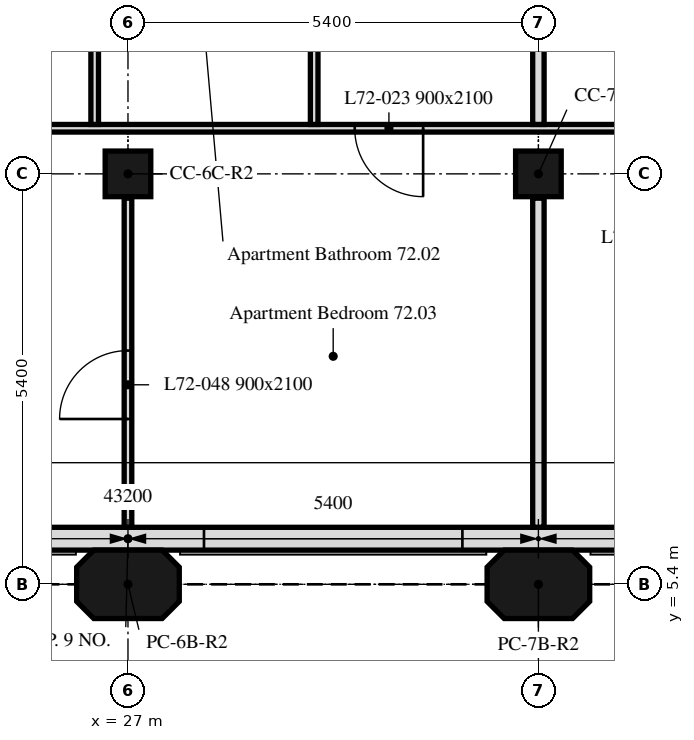
"""IFC4 building model, lengths in metres.
Left out: names, types, materials, properties, quantities, classifications, styles, units other than length and angle.
Written with IfcOpenShell. Run it as: python <this file> out.ifc"""

import sys

from ifc_helpers import new_model, si_unit, direction, frame, frame_2d, origin, origin_2d, place, context, subcontext, project, spatial, polyline, rectangle, outline, extrude, element, fill, save


model = new_model("IFC4")
c1 = context("Model", 3, precision=1e-05, world=origin(), true_north=direction((0.0, 1.0)))
c2 = subcontext(c1, "Body", "Model", "MODEL_VIEW")
j1 = project(units=[si_unit("LENGTHUNIT", "METRE"), si_unit("PLANEANGLEUNIT", "RADIAN")], contexts=[c1])
p1 = place(None, origin())
s1 = spatial("IfcSite", under=j1, at=p1, CompositionType="ELEMENT")
p2 = place(p1, origin())
s2 = spatial("IfcBuilding", under=s1, at=p2, CompositionType="ELEMENT")
p3 = place(p2, frame((0.0, 0.0, 291.7)))
s3 = spatial("IfcBuildingStorey", under=s2, at=p3, CompositionType="ELEMENT", Elevation=291.7)
for number, where, z_axis, x_axis in (
    (1, (27.0, 5.4, 0.0), (0.0, 0.0, 1.0), (1.0, 0.0, 0.0)),
    (2, (32.4, 5.4, 0.0), (0.0, 0.0, 1.0), (1.0, 0.0, 0.0)),
):
    element("IfcColumn", number, at=place(p3, frame(where, z_axis=z_axis, x_axis=x_axis)), inside=s3, PredefinedType="COLUMN", context=c2, shape_type="SweptSolid", body=[
        extrude(outline(polyline([(-0.45, -0.45), (0.45, -0.45), (0.675, -0.225), (0.675, 0.225), (0.45, 0.45), (-0.45, 0.45), (-0.675, 0.225), (-0.675, -0.225), (-0.45, -0.45)])), origin(), (0.0, 0.0, 1.0), 3.0),
    ])
for number, where, z_axis, x_axis in (
    (3, (27.0, 10.8, 0.0), (0.0, 0.0, 1.0), (1.0, 0.0, 0.0)),
    (4, (32.4, 10.8, 0.0), (0.0, 0.0, 1.0), (1.0, 0.0, 0.0)),
):
    element("IfcColumn", number, at=place(p3, frame(where, z_axis=z_axis, x_axis=x_axis)), inside=s3, PredefinedType="COLUMN", context=c2, shape_type="SweptSolid", body=[
        extrude(rectangle(XDim=0.6, YDim=0.6, at=origin_2d()), origin(), (0.0, 0.0, 1.0), 3.0),
    ])
p4 = place(p3, frame((10.986, 6.0, 0.0), z_axis=(0.0, 0.0, 1.0), x_axis=(1.0, 0.0, 0.0)))
e5 = element("IfcWall", 5, at=p4, inside=s3, PredefinedType="SOLIDWALL", context=c2, shape_type="SweptSolid", body=[
    extrude(rectangle(XDim=32.027, YDim=0.3, at=frame_2d((16.014, 0.0))), origin(), (0.0, 0.0, 1.0), 3.0),
])
p5 = place(p4, frame((2.764, 0.0, 0.9)))
e6 = element("IfcOpeningElement", 6, at=p5, cuts=e5, PredefinedType="OPENING", context=c2, shape_type="SweptSolid", body=[
    extrude(rectangle(XDim=1.1, YDim=1.7, at=frame_2d((0.55, 0.85))), frame((0.0, 0.16, 0.0), z_axis=(0.0, -1.0, 0.0), x_axis=(1.0, 0.0, 0.0)), (0.0, 0.0, 1.0), 0.32),
])
p6 = place(p4, frame((6.214, 0.0, 0.9)))
e7 = element("IfcOpeningElement", 7, at=p6, cuts=e5, PredefinedType="OPENING", context=c2, shape_type="SweptSolid", body=[
    extrude(rectangle(XDim=3.4, YDim=1.7, at=frame_2d((1.7, 0.85))), frame((0.0, 0.16, 0.0), z_axis=(0.0, -1.0, 0.0), x_axis=(1.0, 0.0, 0.0)), (0.0, 0.0, 1.0), 0.32),
])
p7 = place(p4, frame((13.564, 0.0, 0.9)))
e8 = element("IfcOpeningElement", 8, at=p7, cuts=e5, PredefinedType="OPENING", context=c2, shape_type="SweptSolid", body=[
    extrude(rectangle(XDim=1.1, YDim=1.7, at=frame_2d((0.55, 0.85))), frame((0.0, 0.16, 0.0), z_axis=(0.0, -1.0, 0.0), x_axis=(1.0, 0.0, 0.0)), (0.0, 0.0, 1.0), 0.32),
])
p8 = place(p4, frame((17.014, 0.0, 0.9)))
e9 = element("IfcOpeningElement", 9, at=p8, cuts=e5, PredefinedType="OPENING", context=c2, shape_type="SweptSolid", body=[
    extrude(rectangle(XDim=3.4, YDim=1.7, at=frame_2d((1.7, 0.85))), frame((0.0, 0.16, 0.0), z_axis=(0.0, -1.0, 0.0), x_axis=(1.0, 0.0, 0.0)), (0.0, 0.0, 1.0), 0.32),
])
p9 = place(p4, frame((24.364, 0.0, 0.9)))
e10 = element("IfcOpeningElement", 10, at=p9, cuts=e5, PredefinedType="OPENING", context=c2, shape_type="SweptSolid", body=[
    extrude(rectangle(XDim=1.1, YDim=1.7, at=frame_2d((0.55, 0.85))), frame((0.0, 0.16, 0.0), z_axis=(0.0, -1.0, 0.0), x_axis=(1.0, 0.0, 0.0)), (0.0, 0.0, 1.0), 0.32),
])
p10 = place(p4, frame((27.814, 0.0, 0.9)))
e11 = element("IfcOpeningElement", 11, at=p10, cuts=e5, PredefinedType="OPENING", context=c2, shape_type="SweptSolid", body=[
    extrude(rectangle(XDim=3.4, YDim=1.7, at=frame_2d((1.7, 0.85))), frame((0.0, 0.16, 0.0), z_axis=(0.0, -1.0, 0.0), x_axis=(1.0, 0.0, 0.0)), (0.0, 0.0, 1.0), 0.32),
])
p11 = place(p3, frame((37.8, 11.4, 0.0), z_axis=(0.0, 0.0, 1.0), x_axis=(-1.0, 0.0, 0.0)))
e12 = element("IfcWall", 12, at=p11, inside=s3, PredefinedType="PARTITIONING", context=c2, shape_type="SweptSolid", body=[
    extrude(rectangle(XDim=21.6, YDim=0.1, at=frame_2d((10.8, 0.0))), origin(), (0.0, 0.0, 1.0), 3.0),
])
p12 = place(p11, frame((18.87, 0.0, 0.0)))
e13 = element("IfcOpeningElement", 13, at=p12, cuts=e12, PredefinedType="OPENING", context=c2, shape_type="SweptSolid", body=[
    extrude(rectangle(XDim=0.9, YDim=2.1, at=frame_2d((0.45, 1.05))), frame((0.0, 0.05, 0.0), z_axis=(0.0, -1.0, 0.0), x_axis=(1.0, 0.0, 0.0)), (0.0, 0.0, 1.0), 0.1),
])
p13 = place(p11, frame((17.5, 0.0, 0.0)))
e14 = element("IfcOpeningElement", 14, at=p13, cuts=e12, PredefinedType="OPENING", context=c2, shape_type="SweptSolid", body=[
    extrude(rectangle(XDim=0.9, YDim=2.1, at=frame_2d((0.45, 1.05))), frame((0.0, 0.05, 0.0), z_axis=(0.0, -1.0, 0.0), x_axis=(1.0, 0.0, 0.0)), (0.0, 0.0, 1.0), 0.1),
])
p14 = place(p11, frame((6.917, 0.0, 0.0)))
e15 = element("IfcOpeningElement", 15, at=p14, cuts=e12, PredefinedType="OPENING", context=c2, shape_type="SweptSolid", body=[
    extrude(rectangle(XDim=0.9, YDim=2.1, at=frame_2d((0.45, 1.05))), frame((0.0, 0.05, 0.0), z_axis=(0.0, -1.0, 0.0), x_axis=(1.0, 0.0, 0.0)), (0.0, 0.0, 1.0), 0.1),
])
p15 = place(p11, frame((3.15, 0.0, 0.0)))
e16 = element("IfcOpeningElement", 16, at=p15, cuts=e12, PredefinedType="OPENING", context=c2, shape_type="SweptSolid", body=[
    extrude(rectangle(XDim=0.9, YDim=2.1, at=frame_2d((0.45, 1.05))), frame((0.0, 0.05, 0.0), z_axis=(0.0, -1.0, 0.0), x_axis=(1.0, 0.0, 0.0)), (0.0, 0.0, 1.0), 0.1),
])
p16 = place(p11, frame((14.158, 0.0, 0.0)))
e17 = element("IfcOpeningElement", 17, at=p16, cuts=e12, PredefinedType="OPENING", context=c2, shape_type="SweptSolid", body=[
    extrude(rectangle(XDim=0.9, YDim=2.1, at=frame_2d((0.45, 1.05))), frame((0.0, 0.05, 0.0), z_axis=(0.0, -1.0, 0.0), x_axis=(1.0, 0.0, 0.0)), (0.0, 0.0, 1.0), 0.1),
])
p17 = place(p11, frame((12.788, 0.0, 0.0)))
e18 = element("IfcOpeningElement", 18, at=p17, cuts=e12, PredefinedType="OPENING", context=c2, shape_type="SweptSolid", body=[
    extrude(rectangle(XDim=0.9, YDim=2.1, at=frame_2d((0.45, 1.05))), frame((0.0, 0.05, 0.0), z_axis=(0.0, -1.0, 0.0), x_axis=(1.0, 0.0, 0.0)), (0.0, 0.0, 1.0), 0.1),
])
p18 = place(p3, frame((27.0, 6.151, 0.0), z_axis=(0.0, 0.0, 1.0), x_axis=(0.0, 1.0, 0.0)))
e19 = element("IfcWall", 19, at=p18, inside=s3, PredefinedType="PARTITIONING", context=c2, shape_type="SweptSolid", body=[
    extrude(rectangle(XDim=4.329, YDim=0.1, at=frame_2d((2.165, 0.0))), origin(), (0.0, 0.0, 1.0), 3.0),
])
p19 = place(p18, frame((1.424, 0.0, 0.0)))
e20 = element("IfcOpeningElement", 20, at=p19, cuts=e19, PredefinedType="OPENING", context=c2, shape_type="SweptSolid", body=[
    extrude(rectangle(XDim=0.9, YDim=2.1, at=frame_2d((0.45, 1.05))), frame((0.0, 0.05, 0.0), z_axis=(0.0, -1.0, 0.0), x_axis=(1.0, 0.0, 0.0)), (0.0, 0.0, 1.0), 0.1),
])
p20 = place(p3, frame((32.4, 6.151, 0.0), z_axis=(0.0, 0.0, 1.0), x_axis=(0.0, 1.0, 0.0)))
e21 = element("IfcWall", 21, at=p20, inside=s3, PredefinedType="PARTITIONING", context=c2, shape_type="SweptSolid", body=[
    extrude(rectangle(XDim=4.329, YDim=0.15, at=frame_2d((2.165, 0.0))), origin(), (0.0, 0.0, 1.0), 3.0),
])
p21 = place(p3, frame((26.562, 11.45, 0.0), z_axis=(0.0, 0.0, 1.0), x_axis=(0.0, 1.0, 0.0)))
e22 = element("IfcWall", 22, at=p21, inside=s3, PredefinedType="PARTITIONING", context=c2, shape_type="SweptSolid", body=[
    extrude(rectangle(XDim=2.425, YDim=0.1, at=frame_2d((1.212, 0.0))), origin(), (0.0, 0.0, 1.0), 3.0),
])
p22 = place(p21, frame((1.275, 0.0, 0.0)))
e23 = element("IfcOpeningElement", 23, at=p22, cuts=e22, PredefinedType="OPENING", context=c2, shape_type="SweptSolid", body=[
    extrude(rectangle(XDim=0.9, YDim=2.1, at=frame_2d((0.45, 1.05))), frame((0.0, 0.05, 0.0), z_axis=(0.0, -1.0, 0.0), x_axis=(1.0, 0.0, 0.0)), (0.0, 0.0, 1.0), 0.1),
])
p23 = place(p3, frame((29.45, 11.45, 0.0), z_axis=(0.0, 0.0, 1.0), x_axis=(0.0, 1.0, 0.0)))
e24 = element("IfcWall", 24, at=p23, inside=s3, PredefinedType="PARTITIONING", context=c2, shape_type="SweptSolid", body=[
    extrude(rectangle(XDim=2.425, YDim=0.1, at=frame_2d((1.212, 0.0))), origin(), (0.0, 0.0, 1.0), 3.0),
])
p24 = place(p3, frame((32.4, 11.45, 0.0), z_axis=(0.0, 0.0, 1.0), x_axis=(0.0, 1.0, 0.0)))
e25 = element("IfcWall", 25, at=p24, inside=s3, PredefinedType="PARTITIONING", context=c2, shape_type="SweptSolid", body=[
    extrude(rectangle(XDim=2.425, YDim=0.15, at=frame_2d((1.212, 0.0))), origin(), (0.0, 0.0, 1.0), 3.0),
])
p25 = place(p8, origin())
e26 = element("IfcWindow", 26, at=p25, inside=s3, PartitioningType="SINGLE_PANEL", PredefinedType="WINDOW", context=c2, shape_type="SweptSolid", body=[
    extrude(rectangle(XDim=3.4, YDim=1.7, at=frame_2d((1.7, 0.85))), frame((0.0, 0.03, 0.0), z_axis=(0.0, -1.0, 0.0), x_axis=(1.0, 0.0, 0.0)), (0.0, 0.0, 1.0), 0.06),
])
fill(e9, e26)
p26 = place(p14, origin())
e27 = element("IfcDoor", 27, at=p26, inside=s3, OperationType="SINGLE_SWING_RIGHT", PredefinedType="DOOR", context=c2, shape_type="SweptSolid", body=[
    extrude(rectangle(XDim=0.9, YDim=2.1, at=frame_2d((0.45, 1.05))), frame((0.0, 0.025, 0.0), z_axis=(0.0, -1.0, 0.0), x_axis=(1.0, 0.0, 0.0)), (0.0, 0.0, 1.0), 0.05),
])
fill(e15, e27)
p27 = place(p19, origin())
e28 = element("IfcDoor", 28, at=p27, inside=s3, OperationType="SINGLE_SWING_LEFT", PredefinedType="DOOR", context=c2, shape_type="SweptSolid", body=[
    extrude(rectangle(XDim=0.9, YDim=2.1, at=frame_2d((0.45, 1.05))), frame((0.0, 0.025, 0.0), z_axis=(0.0, -1.0, 0.0), x_axis=(1.0, 0.0, 0.0)), (0.0, 0.0, 1.0), 0.05),
])
fill(e20, e28)
save(model, sys.argv[1])
